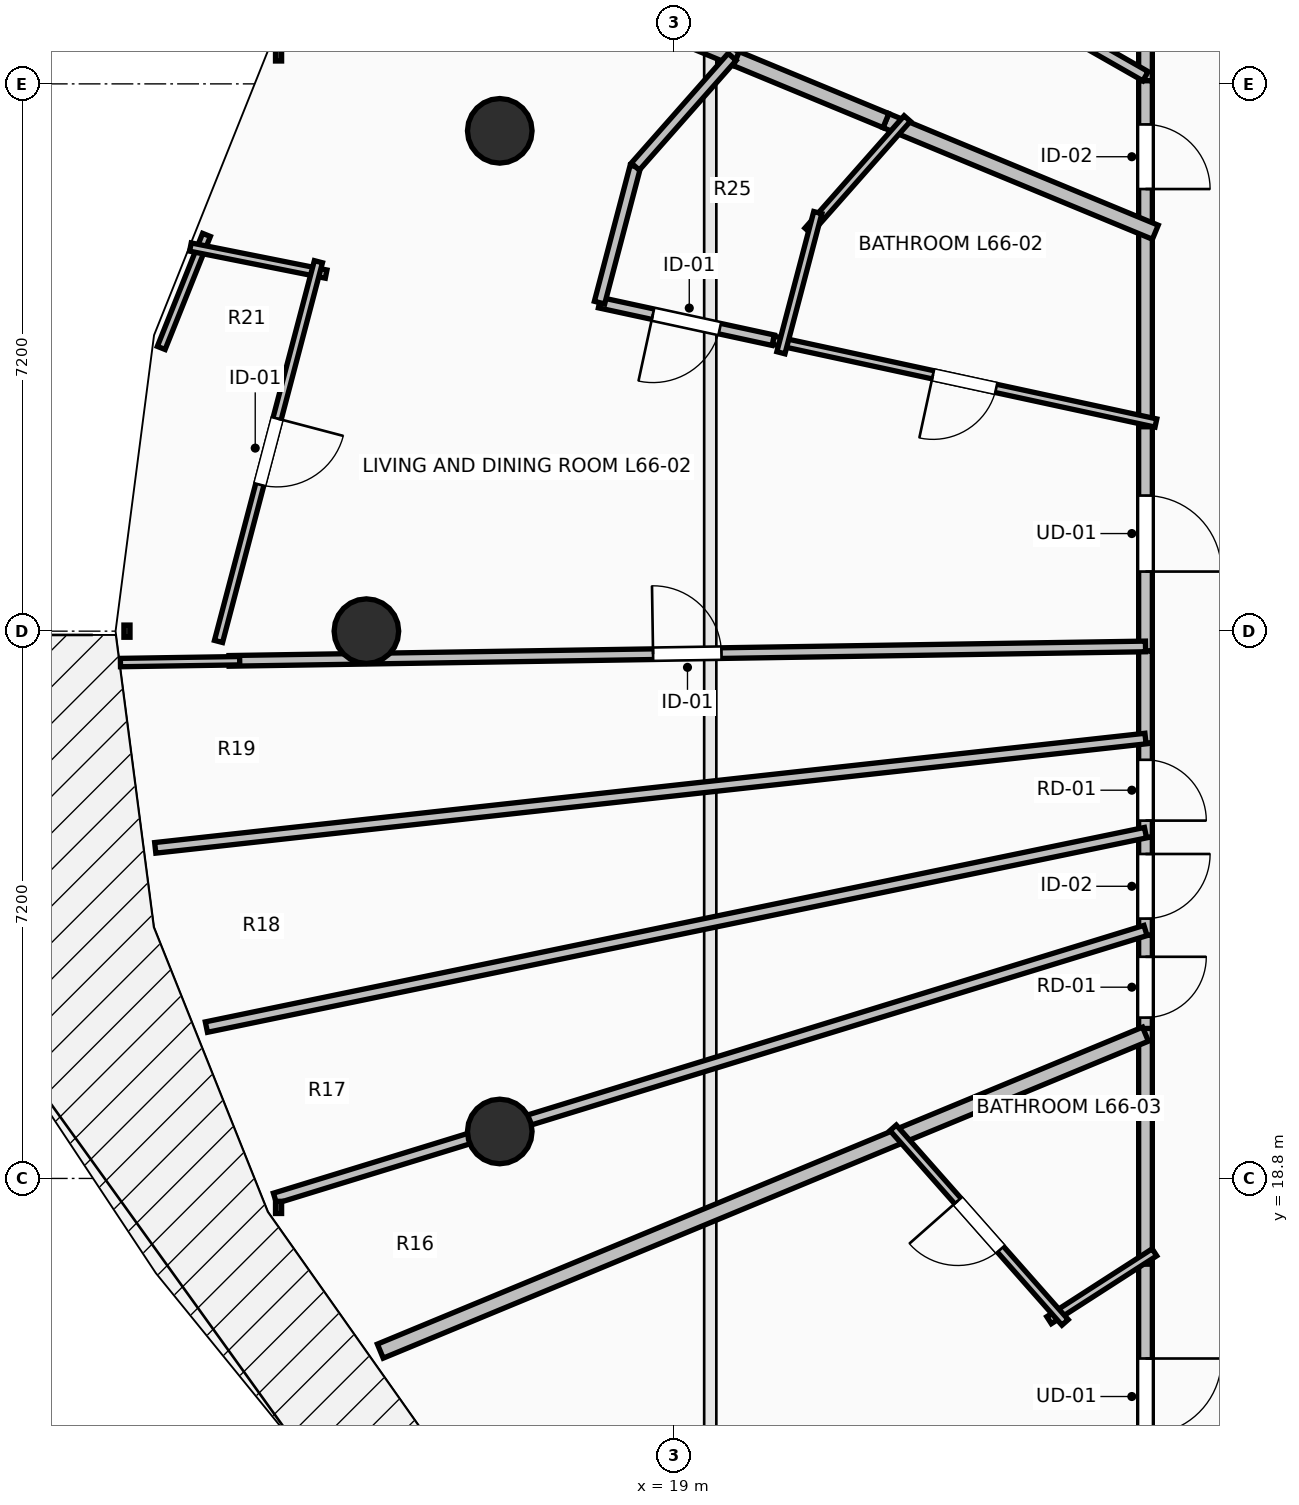
"""IFC4 building model, lengths in metres.
Left out: names, types, materials, properties, quantities, classifications, styles, units other than length and angle.
Written with IfcOpenShell. Run it as: python <this file> out.ifc"""

import sys

from ifc_helpers import new_model, si_unit, direction, frame, frame_2d, origin, origin_2d, place, context, subcontext, project, spatial, rectangle, circle, extrude, element, fill, save


model = new_model("IFC4")
c1 = context("Model", 3, precision=1e-05, world=origin(), true_north=direction((0.0, 1.0)))
c2 = subcontext(c1, "Body", "Model", "MODEL_VIEW")
j1 = project(units=[si_unit("LENGTHUNIT", "METRE"), si_unit("PLANEANGLEUNIT", "RADIAN")], contexts=[c1])
p1 = place(None, origin())
s1 = spatial("IfcSite", under=j1, at=p1, CompositionType="ELEMENT")
p2 = place(p1, origin())
s2 = spatial("IfcBuilding", under=s1, at=p2, CompositionType="ELEMENT")
p3 = place(p2, frame((0.0, 0.0, 244.9)))
s3 = spatial("IfcBuildingStorey", under=s2, at=p3, CompositionType="ELEMENT", Elevation=244.9)
for number, where, z_axis, x_axis in (
    (1, (16.705, 32.582, 0.0), (0.0, 0.0, 1.0), (-0.924, 0.383, 0.0)),
    (2, (14.95, 26.0, 0.0), (0.0, 0.0, 1.0), (-1.0, 0.0, 0.0)),
    (3, (16.705, 19.418, 0.0), (0.0, 0.0, 1.0), (-0.924, -0.383, 0.0)),
):
    element("IfcColumn", number, at=place(p3, frame(where, z_axis=z_axis, x_axis=x_axis)), inside=s3, PredefinedType="COLUMN", context=c2, shape_type="SweptSolid", body=[
        extrude(circle(Radius=0.425, at=origin_2d()), origin(), (0.0, 0.0, 1.0), 3.55),
    ])
p4 = place(p3, frame((25.2, 35.686, 0.0), z_axis=(0.0, 0.0, 1.0), x_axis=(0.0, -1.0, 0.0)))
e4 = element("IfcWall", 4, at=p4, inside=s3, PredefinedType="PARTITIONING", context=c2, shape_type="SweptSolid", body=[
    extrude(rectangle(XDim=2.445, YDim=0.18, at=frame_2d((1.223, 0.0))), origin(), (0.0, 0.0, 1.0), 2.482),
])
p5 = place(p4, frame((0.798, 0.0, 0.0)))
e5 = element("IfcOpeningElement", 5, at=p5, cuts=e4, PredefinedType="OPENING", context=c2, shape_type="SweptSolid", body=[
    extrude(rectangle(XDim=0.85, YDim=2.1, at=frame_2d((0.425, 1.05))), frame((0.0, 0.105, 0.0), z_axis=(0.0, -1.0, 0.0), x_axis=(1.0, 0.0, 0.0)), (0.0, 0.0, 1.0), 0.21),
])
p6 = place(p3, frame((25.2, 33.241, 0.0), z_axis=(0.0, 0.0, 1.0), x_axis=(0.0, -1.0, 0.0)))
e6 = element("IfcWall", 6, at=p6, inside=s3, PredefinedType="PARTITIONING", context=c2, shape_type="SweptSolid", body=[
    extrude(rectangle(XDim=1.999, YDim=0.18, at=frame_2d((1.0, 0.0))), origin(), (0.0, 0.0, 1.0), 3.022),
])
p7 = place(p6, frame((0.574, 0.0, 0.0)))
e7 = element("IfcOpeningElement", 7, at=p7, cuts=e6, PredefinedType="OPENING", context=c2, shape_type="SweptSolid", body=[
    extrude(rectangle(XDim=0.85, YDim=2.1, at=frame_2d((0.425, 1.05))), frame((0.0, 0.105, 0.0), z_axis=(0.0, -1.0, 0.0), x_axis=(1.0, 0.0, 0.0)), (0.0, 0.0, 1.0), 0.21),
])
p8 = place(p3, frame((25.2, 28.829, 0.0), z_axis=(0.0, 0.0, 1.0), x_axis=(0.0, -1.0, 0.0)))
e8 = element("IfcWall", 8, at=p8, inside=s3, PredefinedType="PARTITIONING", context=c2, shape_type="SweptSolid", body=[
    extrude(rectangle(XDim=3.09, YDim=0.18, at=frame_2d((1.545, 0.0))), origin(), (0.0, 0.0, 1.0), 2.482),
])
p9 = place(p8, frame((1.045, 0.0, 0.0)))
e9 = element("IfcOpeningElement", 9, at=p9, cuts=e8, PredefinedType="OPENING", context=c2, shape_type="SweptSolid", body=[
    extrude(rectangle(XDim=1.0, YDim=2.15, at=frame_2d((0.5, 1.075))), frame((0.0, 0.105, 0.0), z_axis=(0.0, -1.0, 0.0), x_axis=(1.0, 0.0, 0.0)), (0.0, 0.0, 1.0), 0.21),
])
p10 = place(p3, frame((25.2, 31.382, 0.0), z_axis=(0.0, 0.0, 1.0), x_axis=(0.0, -1.0, 0.0)))
e10 = element("IfcWall", 10, at=p10, inside=s3, PredefinedType="PARTITIONING", context=c2, shape_type="SweptSolid", body=[
    extrude(rectangle(XDim=2.693, YDim=0.18, at=frame_2d((1.347, 0.0))), origin(), (0.0, 0.0, 1.0), 2.482),
])
p11 = place(p3, frame((25.2, 25.739, 0.0), z_axis=(0.0, 0.0, 1.0), x_axis=(0.0, -1.0, 0.0)))
e11 = element("IfcWall", 11, at=p11, inside=s3, PredefinedType="PARTITIONING", context=c2, shape_type="SweptSolid", body=[
    extrude(rectangle(XDim=1.212, YDim=0.18, at=frame_2d((0.606, 0.0))), origin(), (0.0, 0.0, 1.0), 3.29),
])
p12 = place(p3, frame((25.2, 24.527, 0.0), z_axis=(0.0, 0.0, 1.0), x_axis=(0.0, -1.0, 0.0)))
e12 = element("IfcWall", 12, at=p12, inside=s3, PredefinedType="PARTITIONING", context=c2, shape_type="SweptSolid", body=[
    extrude(rectangle(XDim=1.239, YDim=0.18, at=frame_2d((0.62, 0.0))), origin(), (0.0, 0.0, 1.0), 3.29),
])
p13 = place(p12, frame((0.219, 0.0, 0.0)))
e13 = element("IfcOpeningElement", 13, at=p13, cuts=e12, PredefinedType="OPENING", context=c2, shape_type="SweptSolid", body=[
    extrude(rectangle(XDim=0.8, YDim=2.05, at=frame_2d((0.4, 1.025))), frame((0.0, 0.105, 0.0), z_axis=(0.0, -1.0, 0.0), x_axis=(1.0, 0.0, 0.0)), (0.0, 0.0, 1.0), 0.21),
])
p14 = place(p3, frame((25.2, 23.288, 0.0), z_axis=(0.0, 0.0, 1.0), x_axis=(0.0, -1.0, 0.0)))
e14 = element("IfcWall", 14, at=p14, inside=s3, PredefinedType="PARTITIONING", context=c2, shape_type="SweptSolid", body=[
    extrude(rectangle(XDim=1.289, YDim=0.18, at=frame_2d((0.645, 0.0))), origin(), (0.0, 0.0, 1.0), 3.29),
])
p15 = place(p14, frame((0.219, 0.0, 0.0)))
e15 = element("IfcOpeningElement", 15, at=p15, cuts=e14, PredefinedType="OPENING", context=c2, shape_type="SweptSolid", body=[
    extrude(rectangle(XDim=0.85, YDim=2.1, at=frame_2d((0.425, 1.05))), frame((0.0, 0.105, 0.0), z_axis=(0.0, -1.0, 0.0), x_axis=(1.0, 0.0, 0.0)), (0.0, 0.0, 1.0), 0.21),
])
p16 = place(p3, frame((25.2, 21.999, 0.0), z_axis=(0.0, 0.0, 1.0), x_axis=(0.0, -1.0, 0.0)))
e16 = element("IfcWall", 16, at=p16, inside=s3, PredefinedType="PARTITIONING", context=c2, shape_type="SweptSolid", body=[
    extrude(rectangle(XDim=1.366, YDim=0.18, at=frame_2d((0.683, 0.0))), origin(), (0.0, 0.0, 1.0), 3.29),
])
p17 = place(p16, frame((0.283, 0.0, 0.0)))
e17 = element("IfcOpeningElement", 17, at=p17, cuts=e16, PredefinedType="OPENING", context=c2, shape_type="SweptSolid", body=[
    extrude(rectangle(XDim=0.8, YDim=2.05, at=frame_2d((0.4, 1.025))), frame((0.0, 0.105, 0.0), z_axis=(0.0, -1.0, 0.0), x_axis=(1.0, 0.0, 0.0)), (0.0, 0.0, 1.0), 0.21),
])
p18 = place(p3, frame((25.2, 17.812, 0.0), z_axis=(0.0, 0.0, 1.0), x_axis=(0.0, -1.0, 0.0)))
e18 = element("IfcWall", 18, at=p18, inside=s3, PredefinedType="PARTITIONING", context=c2, shape_type="SweptSolid", body=[
    extrude(rectangle(XDim=3.762, YDim=0.18, at=frame_2d((1.881, 0.0))), origin(), (0.0, 0.0, 1.0), 2.482),
])
p19 = place(p18, frame((1.381, 0.0, 0.0)))
e19 = element("IfcOpeningElement", 19, at=p19, cuts=e18, PredefinedType="OPENING", context=c2, shape_type="SweptSolid", body=[
    extrude(rectangle(XDim=1.0, YDim=2.15, at=frame_2d((0.5, 1.075))), frame((0.0, 0.105, 0.0), z_axis=(0.0, -1.0, 0.0), x_axis=(1.0, 0.0, 0.0)), (0.0, 0.0, 1.0), 0.21),
])
p20 = place(p3, frame((25.2, 20.773, 0.0), z_axis=(0.0, 0.0, 1.0), x_axis=(0.0, -1.0, 0.0)))
e20 = element("IfcWall", 20, at=p20, inside=s3, PredefinedType="PARTITIONING", context=c2, shape_type="SweptSolid", body=[
    extrude(rectangle(XDim=3.101, YDim=0.18, at=frame_2d((1.55, 0.0))), origin(), (0.0, 0.0, 1.0), 3.29),
])
p21 = place(p3, frame((17.17, 37.881, 0.0), z_axis=(0.0, 0.0, 1.0), x_axis=(0.868639415668, -0.495444815844, 0.0)))
e21 = element("IfcWall", 21, at=p21, inside=s3, PredefinedType="PARTITIONING", context=c2, shape_type="SweptSolid", body=[
    extrude(rectangle(XDim=9.244, YDim=0.14, at=frame_2d((4.622, 0.0))), origin(), (0.0, 0.0, 1.0), 2.874),
])
p22 = place(p3, frame((15.133, 35.472, 0.0), z_axis=(0.0, 0.0, 1.0), x_axis=(0.923891232285, -0.382655185392, 0.0)))
e22 = element("IfcWall", 22, at=p22, inside=s3, PredefinedType="PARTITIONING", context=c2, shape_type="SweptSolid", body=[
    extrude(rectangle(XDim=5.07, YDim=0.2, at=frame_2d((2.535, 0.0))), origin(), (0.0, 0.0, 1.0), 2.874),
])
p23 = place(p3, frame((21.785, 32.717, 0.0), z_axis=(0.0, 0.0, 1.0), x_axis=(0.923878783617, -0.382685240352, 0.0)))
e23 = element("IfcWall", 23, at=p23, inside=s3, PredefinedType="PARTITIONING", context=c2, shape_type="SweptSolid", body=[
    extrude(rectangle(XDim=3.837, YDim=0.2, at=frame_2d((1.918, 0.0))), origin(), (0.0, 0.0, 1.0), 2.972),
])
p24 = place(p3, frame((19.817, 33.532, 0.0), z_axis=(0.0, 0.0, 1.0), x_axis=(0.92391905869, -0.382587993786, 0.0)))
e24 = element("IfcWall", 24, at=p24, inside=s3, PredefinedType="PARTITIONING", context=c2, shape_type="SweptSolid", body=[
    extrude(rectangle(XDim=2.13, YDim=0.2, at=frame_2d((1.065, 0.0))), origin(), (0.0, 0.0, 1.0), 2.972),
])
p25 = place(p3, frame((25.337, 28.738, 0.0), z_axis=(0.0, 0.0, 1.0), x_axis=(-0.977382932841, 0.211477191656, 0.0)))
e25 = element("IfcWall", 25, at=p25, inside=s3, PredefinedType="PARTITIONING", context=c2, shape_type="SweptSolid", body=[
    extrude(rectangle(XDim=5.151, YDim=0.11, at=frame_2d((2.576, 0.0))), origin(), (0.0, 0.0, 1.0), 2.482),
])
p26 = place(p25, frame((2.15, 0.0, 0.0)))
e26 = element("IfcOpeningElement", 26, at=p26, cuts=e25, PredefinedType="OPENING", context=c2, shape_type="SweptSolid", body=[
    extrude(rectangle(XDim=0.85, YDim=2.1, at=frame_2d((0.425, 1.05))), frame((0.0, 0.07, 0.0), z_axis=(0.0, -1.0, 0.0), x_axis=(1.0, 0.0, 0.0)), (0.0, 0.0, 1.0), 0.14),
])
p27 = place(p3, frame((12.846, 31.213, 0.0), z_axis=(0.0, 0.0, 1.0), x_axis=(-0.371522095559, -0.928424112414, 0.0)))
e27 = element("IfcWall", 27, at=p27, inside=s3, PredefinedType="PARTITIONING", context=c2, shape_type="SweptSolid", body=[
    extrude(rectangle(XDim=1.602, YDim=0.11, at=frame_2d((0.801, 0.0))), origin(), (0.0, 0.0, 1.0), 3.29),
])
p28 = place(p3, frame((12.635, 31.053, 0.0), z_axis=(0.0, 0.0, 1.0), x_axis=(0.980704252003, -0.195497238094, 0.0)))
e28 = element("IfcWall", 28, at=p28, inside=s3, PredefinedType="PARTITIONING", context=c2, shape_type="SweptSolid", body=[
    extrude(rectangle(XDim=1.821, YDim=0.11, at=frame_2d((0.91, 0.0))), origin(), (0.0, 0.0, 1.0), 3.29),
])
p29 = place(p3, frame((14.319, 30.86, 0.0), z_axis=(0.0, 0.0, 1.0), x_axis=(-0.254404898477, -0.967097796312, 0.0)))
e29 = element("IfcWall", 29, at=p29, inside=s3, PredefinedType="PARTITIONING", context=c2, shape_type="SweptSolid", body=[
    extrude(rectangle(XDim=5.166, YDim=0.11, at=frame_2d((2.583, 0.0))), origin(), (0.0, 0.0, 1.0), 3.29),
])
p30 = place(p29, frame((2.133, 0.0, 0.0)))
e30 = element("IfcOpeningElement", 30, at=p30, cuts=e29, PredefinedType="OPENING", context=c2, shape_type="SweptSolid", body=[
    extrude(rectangle(XDim=0.9, YDim=2.1, at=frame_2d((0.45, 1.05))), frame((0.0, 0.07, 0.0), z_axis=(0.0, -1.0, 0.0), x_axis=(1.0, 0.0, 0.0)), (0.0, 0.0, 1.0), 0.14),
])
p31 = place(p3, frame((20.302, 29.828, 0.0), z_axis=(0.0, 0.0, 1.0), x_axis=(-0.977387924942, 0.211454118377, 0.0)))
e31 = element("IfcWall", 31, at=p31, inside=s3, PredefinedType="PARTITIONING", context=c2, shape_type="SweptSolid", body=[
    extrude(rectangle(XDim=2.338, YDim=0.14, at=frame_2d((1.169, 0.0))), origin(), (0.0, 0.0, 1.0), 2.972),
])
p32 = place(p31, frame((0.719, 0.0, 0.0)))
e32 = element("IfcOpeningElement", 32, at=p32, cuts=e31, PredefinedType="OPENING", context=c2, shape_type="SweptSolid", body=[
    extrude(rectangle(XDim=0.9, YDim=2.1, at=frame_2d((0.45, 1.05))), frame((0.0, 0.085, 0.0), z_axis=(0.0, -1.0, 0.0), x_axis=(1.0, 0.0, 0.0)), (0.0, 0.0, 1.0), 0.17),
])
p33 = place(p3, frame((18.017, 30.322, 0.0), z_axis=(0.0, 0.0, 1.0), x_axis=(0.254434866485, 0.967089912426, 0.0)))
e33 = element("IfcWall", 33, at=p33, inside=s3, PredefinedType="PARTITIONING", context=c2, shape_type="SweptSolid", body=[
    extrude(rectangle(XDim=1.851, YDim=0.14, at=frame_2d((0.926, 0.0))), origin(), (0.0, 0.0, 1.0), 2.482),
])
p34 = place(p3, frame((18.488, 32.112, 0.0), z_axis=(0.0, 0.0, 1.0), x_axis=(0.661856531983, 0.749630529709, 0.0)))
e34 = element("IfcWall", 34, at=p34, inside=s3, PredefinedType="PARTITIONING", context=c2, shape_type="SweptSolid", body=[
    extrude(rectangle(XDim=1.925, YDim=0.14, at=frame_2d((0.962, 0.0))), origin(), (0.0, 0.0, 1.0), 2.482),
])
p35 = place(p3, frame((13.143, 25.609, 0.0), z_axis=(0.0, 0.0, 1.0), x_axis=(0.999875613351, 0.015772058374, 0.0)))
e35 = element("IfcWall", 35, at=p35, inside=s3, PredefinedType="PARTITIONING", context=c2, shape_type="SweptSolid", body=[
    extrude(rectangle(XDim=12.058, YDim=0.14, at=frame_2d((6.029, 0.0))), origin(), (0.0, 0.0, 1.0), 2.874),
])
p36 = place(p35, frame((5.579, 0.0, 0.0)))
e36 = element("IfcOpeningElement", 36, at=p36, cuts=e35, PredefinedType="OPENING", context=c2, shape_type="SweptSolid", body=[
    extrude(rectangle(XDim=0.9, YDim=2.1, at=frame_2d((0.45, 1.05))), frame((0.0, 0.085, 0.0), z_axis=(0.0, -1.0, 0.0), x_axis=(1.0, 0.0, 0.0)), (0.0, 0.0, 1.0), 0.17),
])
p37 = place(p3, frame((22.066, 32.744, 0.0), z_axis=(0.0, 0.0, 1.0), x_axis=(-0.662047420969, -0.749461948593, 0.0)))
e37 = element("IfcWall", 37, at=p37, inside=s3, PredefinedType="PARTITIONING", context=c2, shape_type="SweptSolid", body=[
    extrude(rectangle(XDim=1.972, YDim=0.11, at=frame_2d((0.986, 0.0))), origin(), (0.0, 0.0, 1.0), 2.972),
])
p38 = place(p3, frame((20.889, 31.506, 0.0), z_axis=(0.0, 0.0, 1.0), x_axis=(-0.254568935897, -0.967054629727, 0.0)))
e38 = element("IfcWall", 38, at=p38, inside=s3, PredefinedType="PARTITIONING", context=c2, shape_type="SweptSolid", body=[
    extrude(rectangle(XDim=1.906, YDim=0.11, at=frame_2d((0.953, 0.0))), origin(), (0.0, 0.0, 1.0), 2.482),
])
p39 = place(p3, frame((11.714, 25.587, 0.0), z_axis=(0.0, 0.0, 1.0), x_axis=(0.9998813462, 0.015404334465, 0.0)))
e39 = element("IfcWall", 39, at=p39, inside=s3, PredefinedType="PARTITIONING", context=c2, shape_type="SweptSolid", body=[
    extrude(rectangle(XDim=1.569, YDim=0.11, at=frame_2d((0.785, 0.0))), origin(), (0.0, 0.0, 1.0), 3.29),
])
p40 = place(p3, frame((12.172, 23.149, 0.0), z_axis=(0.0, 0.0, 1.0), x_axis=(0.993963433103, 0.109711866515, 0.0)))
e40 = element("IfcWall", 40, at=p40, inside=s3, PredefinedType="PARTITIONING", context=c2, shape_type="SweptSolid", body=[
    extrude(rectangle(XDim=13.107, YDim=0.14, at=frame_2d((6.553, 0.0))), origin(), (0.0, 0.0, 1.0), 2.874),
])
p41 = place(p3, frame((12.845, 20.791, 0.0), z_axis=(0.0, 0.0, 1.0), x_axis=(0.97923049011, 0.202750208975, 0.0)))
e41 = element("IfcWall", 41, at=p41, inside=s3, PredefinedType="PARTITIONING", context=c2, shape_type="SweptSolid", body=[
    extrude(rectangle(XDim=12.617, YDim=0.14, at=frame_2d((6.309, 0.0))), origin(), (0.0, 0.0, 1.0), 2.874),
])
p42 = place(p3, frame((13.747, 18.539, 0.0), z_axis=(0.0, 0.0, 1.0), x_axis=(0.955802794564, 0.294008533725, 0.0)))
e42 = element("IfcWall", 42, at=p42, inside=s3, PredefinedType="PARTITIONING", context=c2, shape_type="SweptSolid", body=[
    extrude(rectangle(XDim=11.982, YDim=0.14, at=frame_2d((5.991, 0.0))), origin(), (0.0, 0.0, 1.0), 2.482),
])
p43 = place(p3, frame((15.133, 16.528, 0.0), z_axis=(0.0, 0.0, 1.0), x_axis=(0.923877013663, 0.382689513347, 0.0)))
e43 = element("IfcWall", 43, at=p43, inside=s3, PredefinedType="PARTITIONING", context=c2, shape_type="SweptSolid", body=[
    extrude(rectangle(XDim=10.896, YDim=0.2, at=frame_2d((5.448, 0.0))), origin(), (0.0, 0.0, 1.0), 2.482),
])
p44 = place(p3, frame((25.318, 17.828, 0.0), z_axis=(0.0, 0.0, 1.0), x_axis=(-0.840783734709, -0.541371140207, 0.0)))
e44 = element("IfcWall", 44, at=p44, inside=s3, PredefinedType="PARTITIONING", context=c2, shape_type="SweptSolid", body=[
    extrude(rectangle(XDim=1.649, YDim=0.11, at=frame_2d((0.824, 0.0))), origin(), (0.0, 0.0, 1.0), 2.482),
])
p45 = place(p3, frame((24.142, 16.906, 0.0), z_axis=(0.0, 0.0, 1.0), x_axis=(-0.662044708061, 0.749464345068, 0.0)))
e45 = element("IfcWall", 45, at=p45, inside=s3, PredefinedType="PARTITIONING", context=c2, shape_type="SweptSolid", body=[
    extrude(rectangle(XDim=3.416, YDim=0.11, at=frame_2d((1.708, 0.0))), origin(), (0.0, 0.0, 1.0), 2.482),
])
p46 = place(p45, frame((1.283, 0.0, 0.0)))
e46 = element("IfcOpeningElement", 46, at=p46, cuts=e45, PredefinedType="OPENING", context=c2, shape_type="SweptSolid", body=[
    extrude(rectangle(XDim=0.85, YDim=2.1, at=frame_2d((0.425, 1.05))), frame((0.0, 0.07, 0.0), z_axis=(0.0, -1.0, 0.0), x_axis=(1.0, 0.0, 0.0)), (0.0, 0.0, 1.0), 0.14),
])
p47 = place(p9, origin())
e47 = element("IfcDoor", 47, at=p47, inside=s3, OperationType="SINGLE_SWING_RIGHT", PredefinedType="DOOR", context=c2, shape_type="SweptSolid", body=[
    extrude(rectangle(XDim=1.0, YDim=2.15, at=frame_2d((0.5, 1.075))), frame((0.0, 0.025, 0.0), z_axis=(0.0, -1.0, 0.0), x_axis=(1.0, 0.0, 0.0)), (0.0, 0.0, 1.0), 0.05),
])
fill(e9, e47)
p48 = place(p19, origin())
e48 = element("IfcDoor", 48, at=p48, inside=s3, OperationType="SINGLE_SWING_LEFT", PredefinedType="DOOR", context=c2, shape_type="SweptSolid", body=[
    extrude(rectangle(XDim=1.0, YDim=2.15, at=frame_2d((0.5, 1.075))), frame((0.0, 0.025, 0.0), z_axis=(0.0, -1.0, 0.0), x_axis=(1.0, 0.0, 0.0)), (0.0, 0.0, 1.0), 0.05),
])
fill(e19, e48)
p49 = place(p26, origin())
e49 = element("IfcDoor", 49, at=p49, inside=s3, OperationType="SINGLE_SWING_RIGHT", PredefinedType="DOOR", context=c2, shape_type="SweptSolid", body=[
    extrude(rectangle(XDim=0.85, YDim=2.1, at=frame_2d((0.425, 1.05))), frame((0.0, 0.025, 0.0), z_axis=(0.0, -1.0, 0.0), x_axis=(1.0, 0.0, 0.0)), (0.0, 0.0, 1.0), 0.05),
])
fill(e26, e49)
p50 = place(p30, origin())
e50 = element("IfcDoor", 50, at=p50, inside=s3, OperationType="SINGLE_SWING_LEFT", PredefinedType="DOOR", context=c2, shape_type="SweptSolid", body=[
    extrude(rectangle(XDim=0.9, YDim=2.1, at=frame_2d((0.45, 1.05))), frame((0.0, 0.025, 0.0), z_axis=(0.0, -1.0, 0.0), x_axis=(1.0, 0.0, 0.0)), (0.0, 0.0, 1.0), 0.05),
])
fill(e30, e50)
p51 = place(p32, origin())
e51 = element("IfcDoor", 51, at=p51, inside=s3, OperationType="SINGLE_SWING_RIGHT", PredefinedType="DOOR", context=c2, shape_type="SweptSolid", body=[
    extrude(rectangle(XDim=0.9, YDim=2.1, at=frame_2d((0.45, 1.05))), frame((0.0, 0.025, 0.0), z_axis=(0.0, -1.0, 0.0), x_axis=(1.0, 0.0, 0.0)), (0.0, 0.0, 1.0), 0.05),
])
fill(e32, e51)
p52 = place(p36, origin())
e52 = element("IfcDoor", 52, at=p52, inside=s3, OperationType="SINGLE_SWING_LEFT", PredefinedType="DOOR", context=c2, shape_type="SweptSolid", body=[
    extrude(rectangle(XDim=0.9, YDim=2.1, at=frame_2d((0.45, 1.05))), frame((0.0, 0.025, 0.0), z_axis=(0.0, -1.0, 0.0), x_axis=(1.0, 0.0, 0.0)), (0.0, 0.0, 1.0), 0.05),
])
fill(e36, e52)
p53 = place(p46, origin())
e53 = element("IfcDoor", 53, at=p53, inside=s3, OperationType="SINGLE_SWING_RIGHT", PredefinedType="DOOR", context=c2, shape_type="SweptSolid", body=[
    extrude(rectangle(XDim=0.85, YDim=2.1, at=frame_2d((0.425, 1.05))), frame((0.0, 0.025, 0.0), z_axis=(0.0, -1.0, 0.0), x_axis=(1.0, 0.0, 0.0)), (0.0, 0.0, 1.0), 0.05),
])
fill(e46, e53)
p54 = place(p7, origin())
e54 = element("IfcDoor", 54, at=p54, inside=s3, OperationType="SINGLE_SWING_RIGHT", PredefinedType="DOOR", context=c2, shape_type="SweptSolid", body=[
    extrude(rectangle(XDim=0.85, YDim=2.1, at=frame_2d((0.425, 1.05))), frame((0.0, 0.025, 0.0), z_axis=(0.0, -1.0, 0.0), x_axis=(1.0, 0.0, 0.0)), (0.0, 0.0, 1.0), 0.05),
])
fill(e7, e54)
p55 = place(p13, origin())
e55 = element("IfcDoor", 55, at=p55, inside=s3, OperationType="SINGLE_SWING_RIGHT", PredefinedType="DOOR", context=c2, shape_type="SweptSolid", body=[
    extrude(rectangle(XDim=0.8, YDim=2.05, at=frame_2d((0.4, 1.025))), frame((0.0, 0.025, 0.0), z_axis=(0.0, -1.0, 0.0), x_axis=(1.0, 0.0, 0.0)), (0.0, 0.0, 1.0), 0.05),
])
fill(e13, e55)
p56 = place(p15, origin())
e56 = element("IfcDoor", 56, at=p56, inside=s3, OperationType="SINGLE_SWING_LEFT", PredefinedType="DOOR", context=c2, shape_type="SweptSolid", body=[
    extrude(rectangle(XDim=0.85, YDim=2.1, at=frame_2d((0.425, 1.05))), frame((0.0, 0.025, 0.0), z_axis=(0.0, -1.0, 0.0), x_axis=(1.0, 0.0, 0.0)), (0.0, 0.0, 1.0), 0.05),
])
fill(e15, e56)
p57 = place(p17, origin())
e57 = element("IfcDoor", 57, at=p57, inside=s3, OperationType="SINGLE_SWING_LEFT", PredefinedType="DOOR", context=c2, shape_type="SweptSolid", body=[
    extrude(rectangle(XDim=0.8, YDim=2.05, at=frame_2d((0.4, 1.025))), frame((0.0, 0.025, 0.0), z_axis=(0.0, -1.0, 0.0), x_axis=(1.0, 0.0, 0.0)), (0.0, 0.0, 1.0), 0.05),
])
fill(e17, e57)
save(model, sys.argv[1])
